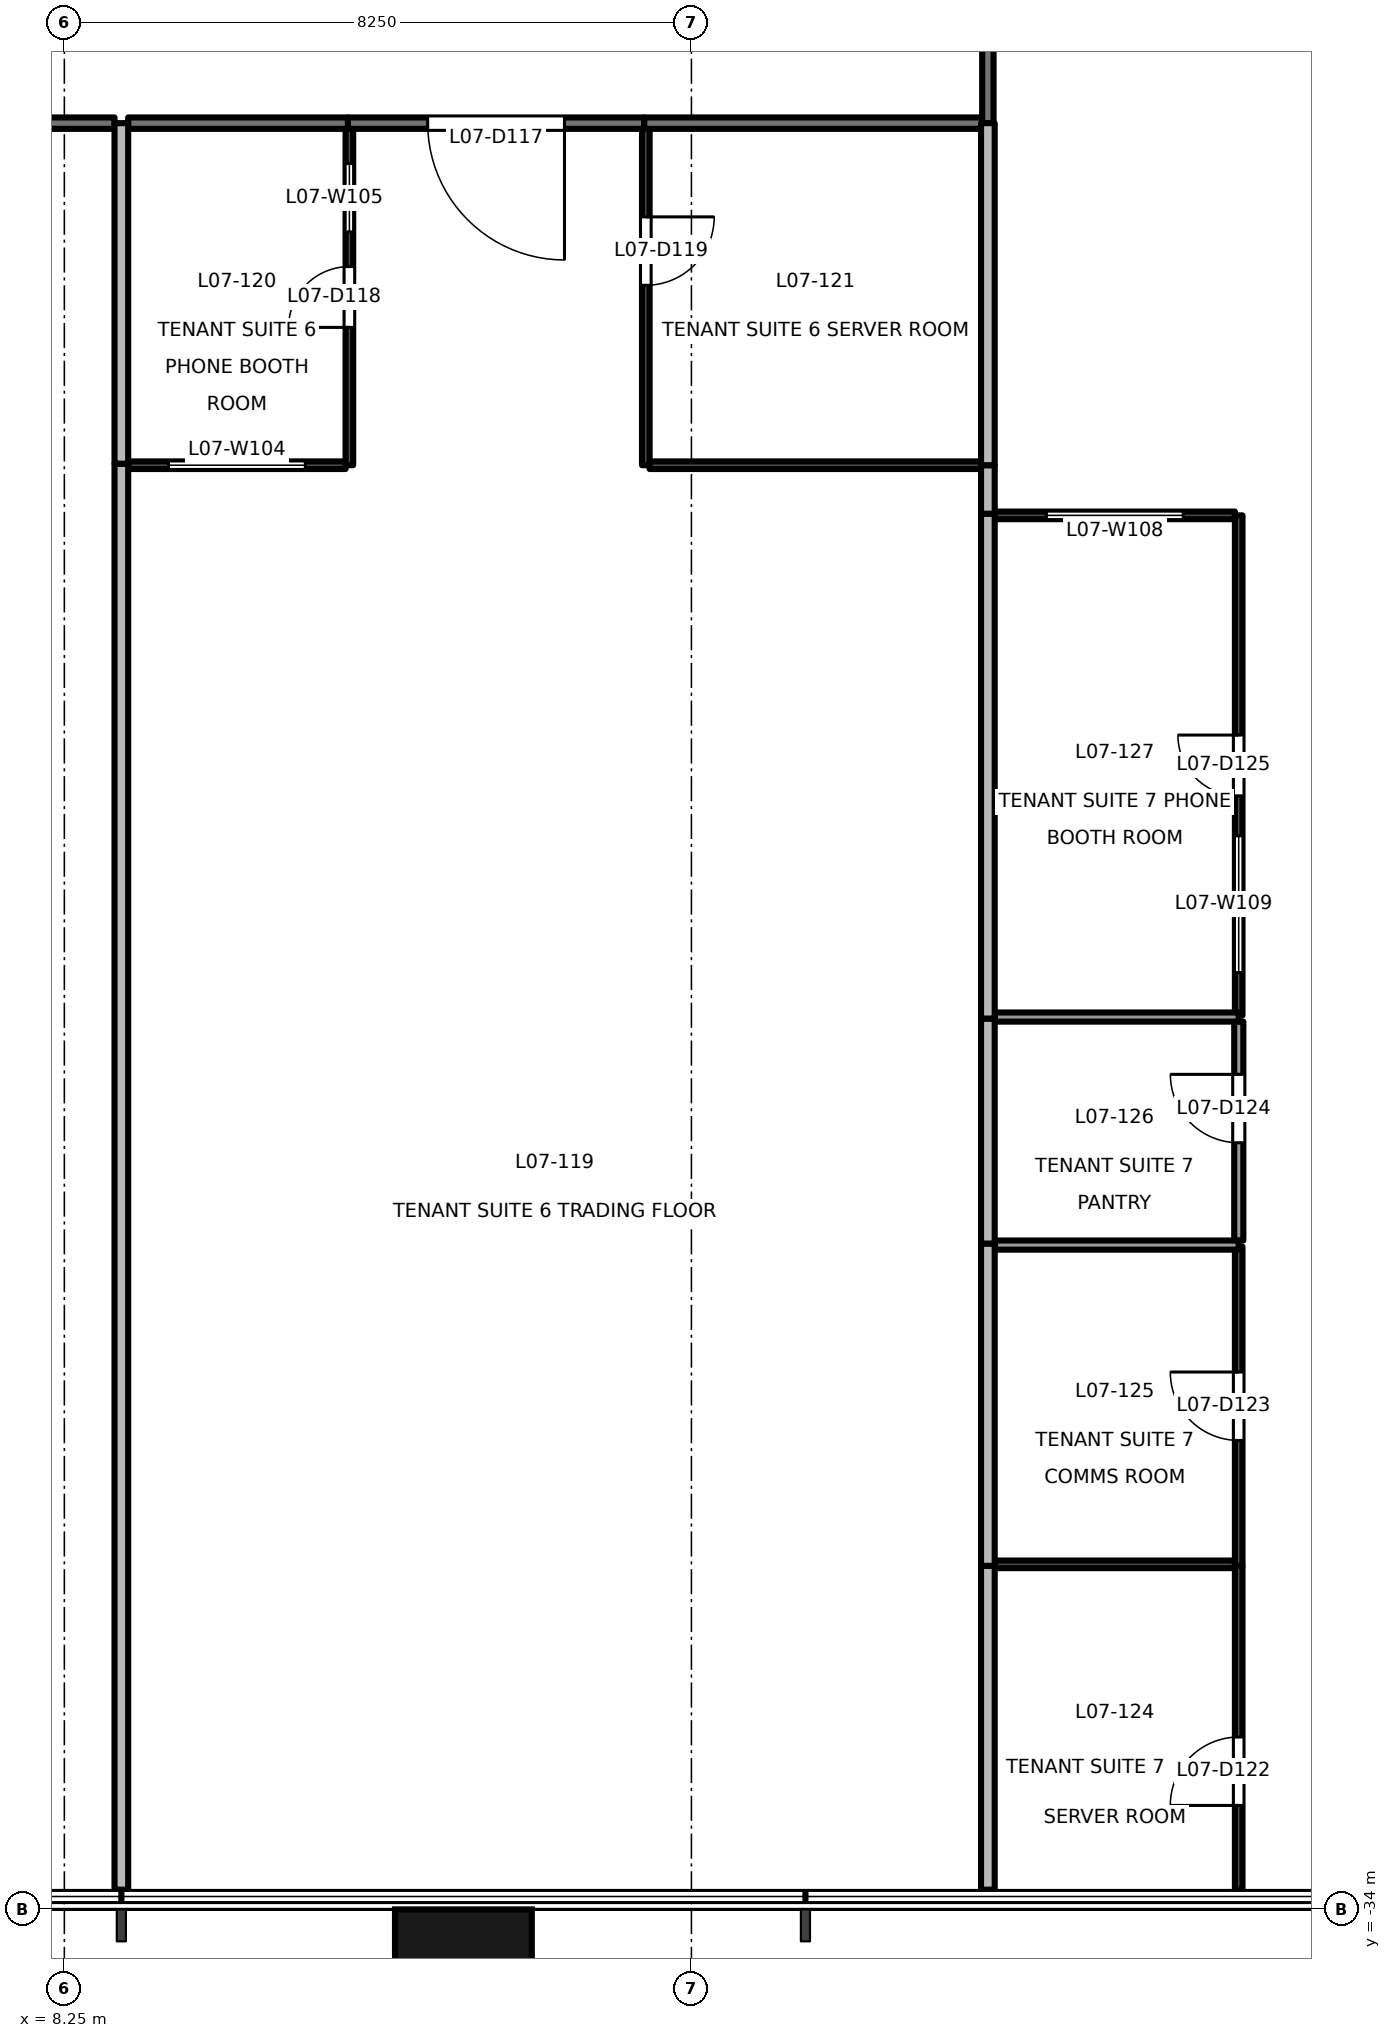
"""IFC4 building model, lengths in metres.
Left out: names, types, materials, properties, quantities, classifications, styles, units other than length and angle.
Written with IfcOpenShell. Run it as: python <this file> out.ifc"""

import sys

from ifc_helpers import new_model, si_unit, direction, frame, frame_2d, origin, origin_2d, place, context, subcontext, project, spatial, rectangle, extrude, element, fill, save


model = new_model("IFC4")
c1 = context("Model", 3, precision=1e-05, world=origin(), true_north=direction((0.0, 1.0)))
c2 = subcontext(c1, "Body", "Model", "MODEL_VIEW")
j1 = project(units=[si_unit("LENGTHUNIT", "METRE"), si_unit("PLANEANGLEUNIT", "RADIAN")], contexts=[c1])
p1 = place(None, origin())
s1 = spatial("IfcSite", under=j1, at=p1, CompositionType="ELEMENT")
p2 = place(p1, origin())
s2 = spatial("IfcBuilding", under=s1, at=p2, CompositionType="ELEMENT")
p3 = place(p2, frame((0.0, 0.0, 36.5)))
s3 = spatial("IfcBuildingStorey", under=s2, at=p3, CompositionType="ELEMENT", Elevation=36.5)
p4 = place(p3, frame((13.5, -34.9, -0.2), z_axis=(0.0, 0.0, 1.0), x_axis=(1.0, 0.0, 0.0)))
e1 = element("IfcColumn", 1, at=p4, inside=s3, PredefinedType="COLUMN", context=c2, shape_type="SweptSolid", body=[
    extrude(rectangle(XDim=1.8, YDim=1.8, at=origin_2d()), origin(), (0.0, 0.0, 1.0), 4.1),
])
p5 = place(p3, frame((8.91, -10.5, 0.0), z_axis=(0.0, 0.0, 1.0), x_axis=(-1.0, 0.0, 0.0)))
e2 = element("IfcWall", 2, at=p5, inside=s3, PredefinedType="PARTITIONING", context=c2, shape_type="SweptSolid", body=[
    extrude(rectangle(XDim=5.93, YDim=0.15, at=frame_2d((2.965, 0.0))), origin(), (0.0, 0.0, 1.0), 2.9),
])
p6 = place(p5, frame((3.197, 0.0, 0.0)))
e3 = element("IfcOpeningElement", 3, at=p6, cuts=e2, PredefinedType="OPENING", context=c2, shape_type="SweptSolid", body=[
    extrude(rectangle(XDim=1.5, YDim=2.1, at=frame_2d((0.75, 1.05))), frame((0.0, 0.085, 0.0), z_axis=(0.0, -1.0, 0.0), x_axis=(1.0, 0.0, 0.0)), (0.0, 0.0, 1.0), 0.171),
])
p7 = place(p3, frame((15.88, -10.5, 0.0), z_axis=(0.0, 0.0, 1.0), x_axis=(-1.0, 0.0, 0.0)))
e4 = element("IfcWall", 4, at=p7, inside=s3, PredefinedType="PARTITIONING", context=c2, shape_type="SweptSolid", body=[
    extrude(rectangle(XDim=3.9, YDim=0.15, at=frame_2d((1.95, 0.0))), origin(), (0.0, 0.0, 1.0), 2.9),
])
p8 = place(p7, frame((1.05, 0.0, 0.0)))
e5 = element("IfcOpeningElement", 5, at=p8, cuts=e4, PredefinedType="OPENING", context=c2, shape_type="SweptSolid", body=[
    extrude(rectangle(XDim=1.8, YDim=2.1, at=frame_2d((0.9, 1.05))), frame((0.0, 0.085, 0.0), z_axis=(0.0, -1.0, 0.0), x_axis=(1.0, 0.0, 0.0)), (0.0, 0.0, 1.0), 0.171),
])
p9 = place(p3, frame((11.98, -10.5, 0.0), z_axis=(0.0, 0.0, 1.0), x_axis=(-1.0, 0.0, 0.0)))
e6 = element("IfcWall", 6, at=p9, inside=s3, PredefinedType="PARTITIONING", context=c2, shape_type="SweptSolid", body=[
    extrude(rectangle(XDim=2.89, YDim=0.15, at=frame_2d((1.445, 0.0))), origin(), (0.0, 0.0, 1.0), 2.9),
])
p10 = place(p3, frame((20.325, -10.5, 0.0), z_axis=(0.0, 0.0, 1.0), x_axis=(-1.0, 0.0, 0.0)))
e7 = element("IfcWall", 7, at=p10, inside=s3, PredefinedType="PARTITIONING", context=c2, shape_type="SweptSolid", body=[
    extrude(rectangle(XDim=4.445, YDim=0.15, at=frame_2d((2.223, 0.0))), origin(), (0.0, 0.0, 1.0), 2.5),
])
p11 = place(p3, frame((20.4, -4.817, 0.0), z_axis=(0.0, 0.0, 1.0), x_axis=(0.0, -1.0, 0.0)))
e8 = element("IfcWall", 8, at=p11, inside=s3, PredefinedType="PARTITIONING", context=c2, shape_type="SweptSolid", body=[
    extrude(rectangle(XDim=5.683, YDim=0.15, at=frame_2d((2.842, 0.0))), origin(), (0.0, 0.0, 1.0), 3.3),
])
p12 = place(p11, frame((1.942, 0.0, 0.0)))
e9 = element("IfcOpeningElement", 9, at=p12, cuts=e8, PredefinedType="OPENING", context=c2, shape_type="SweptSolid", body=[
    extrude(rectangle(XDim=1.8, YDim=2.1, at=frame_2d((0.9, 1.05))), frame((0.0, 0.085, 0.0), z_axis=(0.0, -1.0, 0.0), x_axis=(1.0, 0.0, 0.0)), (0.0, 0.0, 1.0), 0.171),
])
p13 = place(p3, frame((9.0, -14.98, 0.0), z_axis=(0.0, 0.0, 1.0), x_axis=(0.0, -1.0, 0.0)))
e10 = element("IfcWall", 10, at=p13, inside=s3, PredefinedType="PARTITIONING", context=c2, shape_type="SweptSolid", body=[
    extrude(rectangle(XDim=18.76, YDim=0.18, at=frame_2d((9.38, 0.0))), origin(), (0.0, 0.0, 1.0), 2.9),
])
p14 = place(p3, frame((9.0, -10.5, 0.0), z_axis=(0.0, 0.0, 1.0), x_axis=(0.0, -1.0, 0.0)))
e11 = element("IfcWall", 11, at=p14, inside=s3, PredefinedType="PARTITIONING", context=c2, shape_type="SweptSolid", body=[
    extrude(rectangle(XDim=4.48, YDim=0.18, at=frame_2d((2.24, 0.0))), origin(), (0.0, 0.0, 1.0), 2.9),
])
p15 = place(p3, frame((9.09, -15.0, 0.0), z_axis=(0.0, 0.0, 1.0), x_axis=(1.0, 0.0, 0.0)))
e12 = element("IfcWall", 12, at=p15, inside=s3, PredefinedType="PARTITIONING", context=c2, shape_type="SweptSolid", body=[
    extrude(rectangle(XDim=2.86, YDim=0.1, at=frame_2d((1.43, 0.0))), origin(), (0.0, 0.0, 1.0), 2.9),
])
p16 = place(p15, frame((0.53, 0.0, 0.9)))
e13 = element("IfcOpeningElement", 13, at=p16, cuts=e12, PredefinedType="OPENING", context=c2, shape_type="SweptSolid", body=[
    extrude(rectangle(XDim=1.8, YDim=1.2, at=frame_2d((0.9, 0.6))), frame((0.0, 0.061, 0.0), z_axis=(0.0, -1.0, 0.0), x_axis=(1.0, 0.0, 0.0)), (0.0, 0.0, 1.0), 0.121),
])
p17 = place(p3, frame((12.0, -15.0, 0.0), z_axis=(0.0, 0.0, 1.0), x_axis=(0.0, 1.0, 0.0)))
e14 = element("IfcWall", 14, at=p17, inside=s3, PredefinedType="PARTITIONING", context=c2, shape_type="SweptSolid", body=[
    extrude(rectangle(XDim=4.425, YDim=0.1, at=frame_2d((2.212, 0.0))), origin(), (0.0, 0.0, 1.0), 3.9),
])
p18 = place(p17, frame((1.813, 0.0, 0.0)))
e15 = element("IfcOpeningElement", 15, at=p18, cuts=e14, PredefinedType="OPENING", context=c2, shape_type="SweptSolid", body=[
    extrude(rectangle(XDim=0.8, YDim=2.1, at=frame_2d((0.4, 1.05))), frame((0.0, 0.061, 0.0), z_axis=(0.0, -1.0, 0.0), x_axis=(1.0, 0.0, 0.0)), (0.0, 0.0, 1.0), 0.121),
])
p19 = place(p17, frame((3.069, 0.0, 0.9)))
e16 = element("IfcOpeningElement", 16, at=p19, cuts=e14, PredefinedType="OPENING", context=c2, shape_type="SweptSolid", body=[
    extrude(rectangle(XDim=0.9, YDim=1.2, at=frame_2d((0.45, 0.6))), frame((0.0, 0.061, 0.0), z_axis=(0.0, -1.0, 0.0), x_axis=(1.0, 0.0, 0.0)), (0.0, 0.0, 1.0), 0.121),
])
p20 = place(p3, frame((15.9, -10.575, 0.0), z_axis=(0.0, 0.0, 1.0), x_axis=(0.0, -1.0, 0.0)))
e17 = element("IfcWall", 17, at=p20, inside=s3, PredefinedType="PARTITIONING", context=c2, shape_type="SweptSolid", body=[
    extrude(rectangle(XDim=4.425, YDim=0.1, at=frame_2d((2.212, 0.0))), origin(), (0.0, 0.0, 1.0), 3.9),
])
p21 = place(p20, frame((1.158, 0.0, 0.0)))
e18 = element("IfcOpeningElement", 18, at=p21, cuts=e17, PredefinedType="OPENING", context=c2, shape_type="SweptSolid", body=[
    extrude(rectangle(XDim=0.9, YDim=2.1, at=frame_2d((0.45, 1.05))), frame((0.0, 0.061, 0.0), z_axis=(0.0, -1.0, 0.0), x_axis=(1.0, 0.0, 0.0)), (0.0, 0.0, 1.0), 0.121),
])
p22 = place(p3, frame((15.95, -15.0, 0.0), z_axis=(0.0, 0.0, 1.0), x_axis=(1.0, 0.0, 0.0)))
e19 = element("IfcWall", 19, at=p22, inside=s3, PredefinedType="PARTITIONING", context=c2, shape_type="SweptSolid", body=[
    extrude(rectangle(XDim=4.36, YDim=0.1, at=frame_2d((2.18, 0.0))), origin(), (0.0, 0.0, 1.0), 2.5),
])
p23 = place(p3, frame((20.4, -15.0, 0.0), z_axis=(0.0, 0.0, 1.0), x_axis=(0.0, -1.0, 0.0)))
e20 = element("IfcWall", 20, at=p23, inside=s3, PredefinedType="PARTITIONING", context=c2, shape_type="SweptSolid", body=[
    extrude(rectangle(XDim=0.64, YDim=0.18, at=frame_2d((0.32, 0.0))), origin(), (0.0, 0.0, 1.0), 3.9),
])
p24 = place(p3, frame((20.4, -29.48, 0.0), z_axis=(0.0, 0.0, 1.0), x_axis=(0.0, -1.0, 0.0)))
e21 = element("IfcWall", 21, at=p24, inside=s3, PredefinedType="PARTITIONING", context=c2, shape_type="SweptSolid", body=[
    extrude(rectangle(XDim=4.26, YDim=0.18, at=frame_2d((2.13, 0.0))), origin(), (0.0, 0.0, 1.0), 3.9),
])
p25 = place(p3, frame((20.4, -25.24, 0.0), z_axis=(0.0, 0.0, 1.0), x_axis=(0.0, -1.0, 0.0)))
e22 = element("IfcWall", 22, at=p25, inside=s3, PredefinedType="PARTITIONING", context=c2, shape_type="SweptSolid", body=[
    extrude(rectangle(XDim=4.24, YDim=0.18, at=frame_2d((2.12, 0.0))), origin(), (0.0, 0.0, 1.0), 3.3),
])
p26 = place(p3, frame((20.4, -22.28, 0.0), z_axis=(0.0, 0.0, 1.0), x_axis=(0.0, -1.0, 0.0)))
e23 = element("IfcWall", 23, at=p26, inside=s3, PredefinedType="PARTITIONING", context=c2, shape_type="SweptSolid", body=[
    extrude(rectangle(XDim=2.96, YDim=0.18, at=frame_2d((1.48, 0.0))), origin(), (0.0, 0.0, 1.0), 3.3),
])
p27 = place(p3, frame((20.4, -15.64, 0.0), z_axis=(0.0, 0.0, 1.0), x_axis=(0.0, -1.0, 0.0)))
e24 = element("IfcWall", 24, at=p27, inside=s3, PredefinedType="PARTITIONING", context=c2, shape_type="SweptSolid", body=[
    extrude(rectangle(XDim=6.64, YDim=0.18, at=frame_2d((3.32, 0.0))), origin(), (0.0, 0.0, 1.0), 3.3),
])
p28 = place(p3, frame((20.4, -10.5, 0.0), z_axis=(0.0, 0.0, 1.0), x_axis=(0.0, -1.0, 0.0)))
e25 = element("IfcWall", 25, at=p28, inside=s3, PredefinedType="PARTITIONING", context=c2, shape_type="SweptSolid", body=[
    extrude(rectangle(XDim=4.5, YDim=0.18, at=frame_2d((2.25, 0.0))), origin(), (0.0, 0.0, 1.0), 3.3),
])
p29 = place(p3, frame((23.7, -33.74, 0.0), z_axis=(0.0, 0.0, 1.0), x_axis=(0.0, 1.0, 0.0)))
e26 = element("IfcWall", 26, at=p29, inside=s3, PredefinedType="PARTITIONING", context=c2, shape_type="SweptSolid", body=[
    extrude(rectangle(XDim=4.26, YDim=0.1, at=frame_2d((2.13, 0.0))), origin(), (0.0, 0.0, 1.0), 3.9),
])
p30 = place(p29, frame((1.108, 0.0, 0.0)))
e27 = element("IfcOpeningElement", 27, at=p30, cuts=e26, PredefinedType="OPENING", context=c2, shape_type="SweptSolid", body=[
    extrude(rectangle(XDim=0.9, YDim=2.1, at=frame_2d((0.45, 1.05))), frame((0.0, 0.061, 0.0), z_axis=(0.0, -1.0, 0.0), x_axis=(1.0, 0.0, 0.0)), (0.0, 0.0, 1.0), 0.121),
])
p31 = place(p3, frame((23.7, -29.48, 0.0), z_axis=(0.0, 0.0, 1.0), x_axis=(0.0, 1.0, 0.0)))
e28 = element("IfcWall", 28, at=p31, inside=s3, PredefinedType="PARTITIONING", context=c2, shape_type="SweptSolid", body=[
    extrude(rectangle(XDim=4.2, YDim=0.1, at=frame_2d((2.1, 0.0))), origin(), (0.0, 0.0, 1.0), 3.3),
])
p32 = place(p31, frame((1.65, 0.0, 0.0)))
e29 = element("IfcOpeningElement", 29, at=p32, cuts=e28, PredefinedType="OPENING", context=c2, shape_type="SweptSolid", body=[
    extrude(rectangle(XDim=0.9, YDim=2.1, at=frame_2d((0.45, 1.05))), frame((0.0, 0.061, 0.0), z_axis=(0.0, -1.0, 0.0), x_axis=(1.0, 0.0, 0.0)), (0.0, 0.0, 1.0), 0.121),
])
p33 = place(p3, frame((23.701, -25.2, 0.0), z_axis=(0.0, 0.0, 1.0), x_axis=(0.0, 1.0, 0.0)))
e30 = element("IfcWall", 30, at=p33, inside=s3, PredefinedType="PARTITIONING", context=c2, shape_type="SweptSolid", body=[
    extrude(rectangle(XDim=2.88, YDim=0.12, at=frame_2d((1.44, 0.0))), origin(), (0.0, 0.0, 1.0), 3.3),
])
p34 = place(p33, frame((1.286, 0.0, 0.0)))
e31 = element("IfcOpeningElement", 31, at=p34, cuts=e30, PredefinedType="OPENING", context=c2, shape_type="SweptSolid", body=[
    extrude(rectangle(XDim=0.9, YDim=2.1, at=frame_2d((0.45, 1.05))), frame((0.0, 0.071, 0.0), z_axis=(0.0, -1.0, 0.0), x_axis=(1.0, 0.0, 0.0)), (0.0, 0.0, 1.0), 0.141),
])
p35 = place(p3, frame((23.65, -15.66, 0.0), z_axis=(0.0, 0.0, 1.0), x_axis=(-1.0, 0.0, 0.0)))
e32 = element("IfcWall", 32, at=p35, inside=s3, PredefinedType="PARTITIONING", context=c2, shape_type="SweptSolid", body=[
    extrude(rectangle(XDim=3.16, YDim=0.1, at=frame_2d((1.58, 0.0))), origin(), (0.0, 0.0, 1.0), 3.9),
])
p36 = place(p35, frame((0.68, 0.0, 0.9)))
e33 = element("IfcOpeningElement", 33, at=p36, cuts=e32, PredefinedType="OPENING", context=c2, shape_type="SweptSolid", body=[
    extrude(rectangle(XDim=1.8, YDim=1.2, at=frame_2d((0.9, 0.6))), frame((0.0, 0.061, 0.0), z_axis=(0.0, -1.0, 0.0), x_axis=(1.0, 0.0, 0.0)), (0.0, 0.0, 1.0), 0.121),
])
p37 = place(p3, frame((23.7, -22.24, 0.0), z_axis=(0.0, 0.0, 1.0), x_axis=(0.0, 1.0, 0.0)))
e34 = element("IfcWall", 34, at=p37, inside=s3, PredefinedType="PARTITIONING", context=c2, shape_type="SweptSolid", body=[
    extrude(rectangle(XDim=6.58, YDim=0.1, at=frame_2d((3.29, 0.0))), origin(), (0.0, 0.0, 1.0), 3.3),
])
p38 = place(p37, frame((2.89, 0.0, 0.0)))
e35 = element("IfcOpeningElement", 35, at=p38, cuts=e34, PredefinedType="OPENING", context=c2, shape_type="SweptSolid", body=[
    extrude(rectangle(XDim=0.8, YDim=2.1, at=frame_2d((0.4, 1.05))), frame((0.0, 0.061, 0.0), z_axis=(0.0, -1.0, 0.0), x_axis=(1.0, 0.0, 0.0)), (0.0, 0.0, 1.0), 0.121),
])
p39 = place(p37, frame((0.565, 0.0, 0.9)))
e36 = element("IfcOpeningElement", 36, at=p39, cuts=e34, PredefinedType="OPENING", context=c2, shape_type="SweptSolid", body=[
    extrude(rectangle(XDim=1.8, YDim=1.2, at=frame_2d((0.9, 0.6))), frame((0.0, 0.061, 0.0), z_axis=(0.0, -1.0, 0.0), x_axis=(1.0, 0.0, 0.0)), (0.0, 0.0, 1.0), 0.121),
])
p40 = place(p3, frame((20.49, -29.46, 0.0), z_axis=(0.0, 0.0, 1.0), x_axis=(1.0, 0.0, 0.0)))
e37 = element("IfcWall", 37, at=p40, inside=s3, PredefinedType="PARTITIONING", context=c2, shape_type="SweptSolid", body=[
    extrude(rectangle(XDim=3.16, YDim=0.1, at=frame_2d((1.58, 0.0))), origin(), (0.0, 0.0, 1.0), 3.9),
])
for number, where, z_axis, x_axis in (
    (38, (20.49, -25.26, 0.0), (0.0, 0.0, 1.0), (1.0, 0.0, 0.0)),
    (39, (20.49, -22.26, 0.0), (0.0, 0.0, 1.0), (1.0, 0.0, 0.0)),
):
    element("IfcWall", number, at=place(p3, frame(where, z_axis=z_axis, x_axis=x_axis)), inside=s3, PredefinedType="PARTITIONING", context=c2, shape_type="SweptSolid", body=[
        extrude(rectangle(XDim=3.21, YDim=0.12, at=frame_2d((1.605, 0.0))), origin(), (0.0, 0.0, 1.0), 3.9),
    ])
p41 = place(p8, origin())
e40 = element("IfcDoor", 40, at=p41, inside=s3, OperationType="DOUBLE_DOOR_SINGLE_SWING", PredefinedType="DOOR", context=c2, shape_type="SweptSolid", body=[
    extrude(rectangle(XDim=1.8, YDim=2.1, at=frame_2d((0.9, 1.05))), frame((0.0, 0.025, 0.0), z_axis=(0.0, -1.0, 0.0), x_axis=(1.0, 0.0, 0.0)), (0.0, 0.0, 1.0), 0.05),
])
fill(e5, e40)
p42 = place(p18, origin())
e41 = element("IfcDoor", 41, at=p42, inside=s3, OperationType="SINGLE_SWING_LEFT", PredefinedType="DOOR", context=c2, shape_type="SweptSolid", body=[
    extrude(rectangle(XDim=0.8, YDim=2.1, at=frame_2d((0.4, 1.05))), frame((0.0, 0.025, 0.0), z_axis=(0.0, -1.0, 0.0), x_axis=(1.0, 0.0, 0.0)), (0.0, 0.0, 1.0), 0.05),
])
fill(e15, e41)
p43 = place(p21, origin())
e42 = element("IfcDoor", 42, at=p43, inside=s3, OperationType="SINGLE_SWING_LEFT", PredefinedType="DOOR", context=c2, shape_type="SweptSolid", body=[
    extrude(rectangle(XDim=0.9, YDim=2.1, at=frame_2d((0.45, 1.05))), frame((0.0, 0.025, 0.0), z_axis=(0.0, -1.0, 0.0), x_axis=(1.0, 0.0, 0.0)), (0.0, 0.0, 1.0), 0.05),
])
fill(e18, e42)
p44 = place(p30, origin())
e43 = element("IfcDoor", 43, at=p44, inside=s3, OperationType="SINGLE_SWING_LEFT", PredefinedType="DOOR", context=c2, shape_type="SweptSolid", body=[
    extrude(rectangle(XDim=0.9, YDim=2.1, at=frame_2d((0.45, 1.05))), frame((0.0, 0.025, 0.0), z_axis=(0.0, -1.0, 0.0), x_axis=(1.0, 0.0, 0.0)), (0.0, 0.0, 1.0), 0.05),
])
fill(e27, e43)
p45 = place(p32, origin())
e44 = element("IfcDoor", 44, at=p45, inside=s3, OperationType="SINGLE_SWING_RIGHT", PredefinedType="DOOR", context=c2, shape_type="SweptSolid", body=[
    extrude(rectangle(XDim=0.9, YDim=2.1, at=frame_2d((0.45, 1.05))), frame((0.0, 0.025, 0.0), z_axis=(0.0, -1.0, 0.0), x_axis=(1.0, 0.0, 0.0)), (0.0, 0.0, 1.0), 0.05),
])
fill(e29, e44)
p46 = place(p34, origin())
e45 = element("IfcDoor", 45, at=p46, inside=s3, OperationType="SINGLE_SWING_RIGHT", PredefinedType="DOOR", context=c2, shape_type="SweptSolid", body=[
    extrude(rectangle(XDim=0.9, YDim=2.1, at=frame_2d((0.45, 1.05))), frame((0.0, 0.025, 0.0), z_axis=(0.0, -1.0, 0.0), x_axis=(1.0, 0.0, 0.0)), (0.0, 0.0, 1.0), 0.05),
])
fill(e31, e45)
p47 = place(p38, origin())
e46 = element("IfcDoor", 46, at=p47, inside=s3, OperationType="SINGLE_SWING_RIGHT", PredefinedType="DOOR", context=c2, shape_type="SweptSolid", body=[
    extrude(rectangle(XDim=0.8, YDim=2.1, at=frame_2d((0.4, 1.05))), frame((0.0, 0.025, 0.0), z_axis=(0.0, -1.0, 0.0), x_axis=(1.0, 0.0, 0.0)), (0.0, 0.0, 1.0), 0.05),
])
fill(e35, e46)
p48 = place(p16, origin())
e47 = element("IfcWindow", 47, at=p48, inside=s3, PartitioningType="SINGLE_PANEL", PredefinedType="WINDOW", context=c2, shape_type="SweptSolid", body=[
    extrude(rectangle(XDim=1.8, YDim=1.2, at=frame_2d((0.9, 0.6))), frame((0.0, 0.03, 0.0), z_axis=(0.0, -1.0, 0.0), x_axis=(1.0, 0.0, 0.0)), (0.0, 0.0, 1.0), 0.06),
])
fill(e13, e47)
p49 = place(p19, origin())
e48 = element("IfcWindow", 48, at=p49, inside=s3, PartitioningType="SINGLE_PANEL", PredefinedType="WINDOW", context=c2, shape_type="SweptSolid", body=[
    extrude(rectangle(XDim=0.9, YDim=1.2, at=frame_2d((0.45, 0.6))), frame((0.0, 0.03, 0.0), z_axis=(0.0, -1.0, 0.0), x_axis=(1.0, 0.0, 0.0)), (0.0, 0.0, 1.0), 0.06),
])
fill(e16, e48)
p50 = place(p36, origin())
e49 = element("IfcWindow", 49, at=p50, inside=s3, PartitioningType="SINGLE_PANEL", PredefinedType="WINDOW", context=c2, shape_type="SweptSolid", body=[
    extrude(rectangle(XDim=1.8, YDim=1.2, at=frame_2d((0.9, 0.6))), frame((0.0, 0.03, 0.0), z_axis=(0.0, -1.0, 0.0), x_axis=(1.0, 0.0, 0.0)), (0.0, 0.0, 1.0), 0.06),
])
fill(e33, e49)
p51 = place(p39, origin())
e50 = element("IfcWindow", 50, at=p51, inside=s3, PartitioningType="SINGLE_PANEL", PredefinedType="WINDOW", context=c2, shape_type="SweptSolid", body=[
    extrude(rectangle(XDim=1.8, YDim=1.2, at=frame_2d((0.9, 0.6))), frame((0.0, 0.03, 0.0), z_axis=(0.0, -1.0, 0.0), x_axis=(1.0, 0.0, 0.0)), (0.0, 0.0, 1.0), 0.06),
])
fill(e36, e50)
save(model, sys.argv[1])
